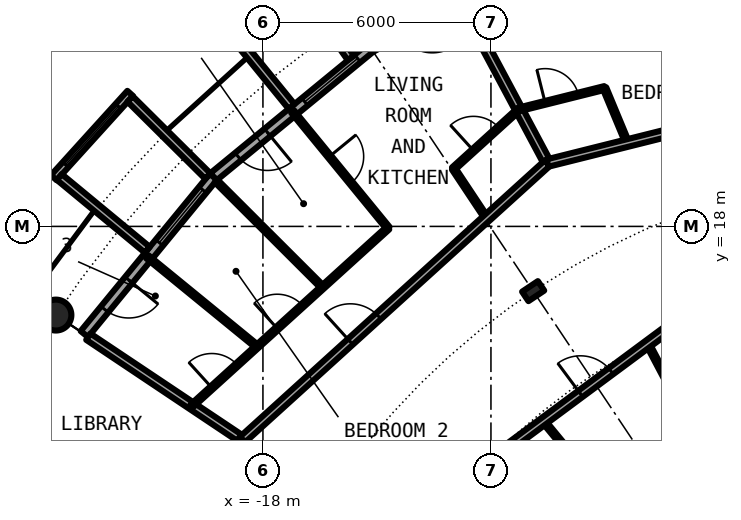
"""IFC4 building model, lengths in metres.
Left out: names, types, materials, properties, quantities, classifications, styles, units other than length and angle.
Written with IfcOpenShell. Run it as: python <this file> out.ifc"""

import sys

from ifc_helpers import new_model, si_unit, direction, frame, frame_2d, origin, origin_2d, place, context, subcontext, project, spatial, rectangle, circle, hollow_circle, i_section, extrude, element, fill, save


model = new_model("IFC4")
c1 = context("Model", 3, precision=1e-05, world=origin(), true_north=direction((0.0, 1.0)))
c2 = subcontext(c1, "Body", "Model", "MODEL_VIEW")
j1 = project(units=[si_unit("LENGTHUNIT", "METRE"), si_unit("PLANEANGLEUNIT", "RADIAN")], contexts=[c1])
p1 = place(None, origin())
s1 = spatial("IfcSite", under=j1, at=p1, CompositionType="ELEMENT")
p2 = place(p1, origin())
s2 = spatial("IfcBuilding", under=s1, at=p2, CompositionType="ELEMENT")
p3 = place(p2, frame((0.0, 0.0, 151.3)))
s3 = spatial("IfcBuildingStorey", under=s2, at=p3, CompositionType="ELEMENT", Elevation=151.3)
p4 = place(p3, frame((-23.448, 15.667, 0.0), z_axis=(0.0, 0.0, 1.0), x_axis=(1.0, 0.0, 0.0)))
e1 = element("IfcColumn", 1, at=p4, inside=s3, PredefinedType="COLUMN", context=c2, shape_type="SweptSolid", body=[
    extrude(hollow_circle(Radius=0.406, WallThickness=0.04, at=origin_2d()), origin(), (0.0, 0.0, 1.0), 3.05),
])
p5 = place(p3, frame((-10.889, 16.297, 0.0), z_axis=(0.0, 0.0, 1.0), x_axis=(-0.55557023302, 0.831469612303, 0.0)))
e2 = element("IfcColumn", 2, at=p5, inside=s3, PredefinedType="COLUMN", context=c2, shape_type="SweptSolid", body=[
    extrude(i_section(OverallWidth=0.3, OverallDepth=0.5, WebThickness=0.014, FlangeThickness=0.028, FilletRadius=0.027, at=origin_2d()), origin(), (0.0, 0.0, 1.0), 3.05),
])
p6 = place(p3, frame((-15.167, 22.699, 0.0), z_axis=(0.0, 0.0, 1.0), x_axis=(-0.773019449054, -0.634382322723, 0.0)))
e3 = element("IfcWall", 3, at=p6, inside=s3, PredefinedType="SOLIDWALL", context=c2, shape_type="SweptSolid", body=[
    extrude(rectangle(XDim=5.352, YDim=0.25, at=frame_2d((2.676, 0.0))), origin(), (0.0, 0.0, 1.0), 2.7),
])
p7 = place(p6, frame((0.441, 0.0, 0.3)))
e4 = element("IfcOpeningElement", 4, at=p7, cuts=e3, PredefinedType="OPENING", context=c2, shape_type="SweptSolid", body=[
    extrude(rectangle(XDim=1.8, YDim=2.1, at=frame_2d((0.9, 1.05))), frame((0.0, 0.135, 0.0), z_axis=(0.0, -1.0, 0.0), x_axis=(1.0, 0.0, 0.0)), (0.0, 0.0, 1.0), 0.27),
])
p8 = place(p6, frame((3.51, 0.0, 0.0)))
e5 = element("IfcOpeningElement", 5, at=p8, cuts=e3, PredefinedType="OPENING", context=c2, shape_type="SweptSolid", body=[
    extrude(rectangle(XDim=1.0, YDim=2.2, at=frame_2d((0.5, 1.1))), frame((0.0, 0.135, 0.0), z_axis=(0.0, -1.0, 0.0), x_axis=(1.0, 0.0, 0.0)), (0.0, 0.0, 1.0), 0.27),
])
p9 = place(p3, frame((-15.688, 22.433, -0.03), z_axis=(0.0, 0.0, 1.0), x_axis=(-0.573260687834, 0.819373043115, 0.0)))
e6 = element("IfcWall", 6, at=p9, inside=s3, PredefinedType="SOLIDWALL", context=c2, shape_type="SweptSolid", body=[
    extrude(rectangle(XDim=2.925, YDim=0.2, at=frame_2d((1.463, 0.0))), origin(), (0.0, 0.0, 1.0), 2.73),
])
p10 = place(p3, frame((-17.246, 21.155, -0.03), z_axis=(0.0, 0.0, 1.0), x_axis=(-0.631741648902, 0.775179004516, 0.0)))
e7 = element("IfcWall", 7, at=p10, inside=s3, PredefinedType="SOLIDWALL", context=c2, shape_type="SweptSolid", body=[
    extrude(rectangle(XDim=3.006, YDim=0.2, at=frame_2d((1.503, 0.0))), origin(), (0.0, 0.0, 1.0), 2.73),
])
p11 = place(p3, frame((-19.304, 19.304, 0.0), z_axis=(0.0, 0.0, 1.0), x_axis=(-0.634382322723, -0.773019449054, 0.0)))
e8 = element("IfcWall", 8, at=p11, inside=s3, PredefinedType="SOLIDWALL", context=c2, shape_type="SweptSolid", body=[
    extrude(rectangle(XDim=5.352, YDim=0.25, at=frame_2d((2.676, 0.0))), origin(), (0.0, 0.0, 1.0), 2.7),
])
p12 = place(p11, frame((0.441, 0.0, 0.3)))
e9 = element("IfcOpeningElement", 9, at=p12, cuts=e8, PredefinedType="OPENING", context=c2, shape_type="SweptSolid", body=[
    extrude(rectangle(XDim=1.8, YDim=2.1, at=frame_2d((0.9, 1.05))), frame((0.0, 0.135, 0.0), z_axis=(0.0, -1.0, 0.0), x_axis=(1.0, 0.0, 0.0)), (0.0, 0.0, 1.0), 0.27),
])
p13 = place(p11, frame((3.51, 0.0, 0.0)))
e10 = element("IfcOpeningElement", 10, at=p13, cuts=e8, PredefinedType="OPENING", context=c2, shape_type="SweptSolid", body=[
    extrude(rectangle(XDim=1.0, YDim=2.2, at=frame_2d((0.5, 1.1))), frame((0.0, 0.135, 0.0), z_axis=(0.0, -1.0, 0.0), x_axis=(1.0, 0.0, 0.0)), (0.0, 0.0, 1.0), 0.27),
])
p14 = place(p3, frame((-21.493, 21.5, -0.03), z_axis=(0.0, 0.0, 1.0), x_axis=(-0.671506829416, -0.740998365753, 0.0)))
e11 = element("IfcWall", 11, at=p14, inside=s3, PredefinedType="SOLIDWALL", context=c2, shape_type="SweptSolid", body=[
    extrude(rectangle(XDim=2.993, YDim=0.2, at=frame_2d((1.497, 0.0))), origin(), (0.0, 0.0, 1.0), 2.73),
])
p15 = place(p14, frame((0.457, 0.0, 0.33)))
e12 = element("IfcOpeningElement", 12, at=p15, cuts=e11, PredefinedType="OPENING", context=c2, shape_type="SweptSolid", body=[
    extrude(circle(Radius=1.04, at=frame_2d((1.04, 1.04))), frame((0.0, 0.11, 0.0), z_axis=(0.0, -1.0, 0.0), x_axis=(1.0, 0.0, 0.0)), (0.0, 0.0, 1.0), 0.22),
])
p16 = place(p3, frame((-19.45, 19.323, -0.03), z_axis=(0.0, 0.0, 1.0), x_axis=(-0.709727076896, 0.704476739375, 0.0)))
e13 = element("IfcWall", 13, at=p16, inside=s3, PredefinedType="SOLIDWALL", context=c2, shape_type="SweptSolid", body=[
    extrude(rectangle(XDim=2.883, YDim=0.2, at=frame_2d((1.441, 0.0))), origin(), (0.0, 0.0, 1.0), 2.73),
])
p17 = place(p3, frame((-21.041, 17.384, -0.03), z_axis=(0.0, 0.0, 1.0), x_axis=(-0.770784861449, 0.63709551667, 0.0)))
e14 = element("IfcWall", 14, at=p17, inside=s3, PredefinedType="SOLIDWALL", context=c2, shape_type="SweptSolid", body=[
    extrude(rectangle(XDim=3.006, YDim=0.2, at=frame_2d((1.503, 0.0))), origin(), (0.0, 0.0, 1.0), 2.73),
])
p18 = place(p3, frame((-12.984, 19.521, 0.0), z_axis=(0.0, 0.0, 1.0), x_axis=(0.55373148684, -0.832695286694, 0.0)))
e15 = element("IfcWall", 15, at=p18, inside=s3, PredefinedType="PARTITIONING", context=c2, shape_type="SweptSolid", body=[
    extrude(rectangle(XDim=1.571, YDim=0.1, at=frame_2d((0.786, 0.0))), origin(), (0.0, 0.0, 1.0), 2.7),
])
p19 = place(p3, frame((-9.013, 21.642, 0.0), z_axis=(0.0, 0.0, 1.0), x_axis=(0.384228756538, -0.923237923099, 0.0)))
e16 = element("IfcWall", 16, at=p19, inside=s3, PredefinedType="PARTITIONING", context=c2, shape_type="SweptSolid", body=[
    extrude(rectangle(XDim=1.569, YDim=0.1, at=frame_2d((0.785, 0.0))), origin(), (0.0, 0.0, 1.0), 2.7),
])
p20 = place(p3, frame((-22.595, 15.098, 0.0), z_axis=(0.0, 0.0, 1.0), x_axis=(0.831387096605, -0.55569370664, 0.0)))
e17 = element("IfcWall", 17, at=p20, inside=s3, PredefinedType="PARTITIONING", context=c2, shape_type="SweptSolid", body=[
    extrude(rectangle(XDim=4.875, YDim=0.2, at=frame_2d((2.438, 0.0))), origin(), (0.0, 0.0, 1.0), 2.7),
])
p21 = place(p3, frame((-21.04, 17.199, 0.0), z_axis=(0.0, 0.0, 1.0), x_axis=(0.774321581607, -0.63279229472, 0.0)))
e18 = element("IfcWall", 18, at=p21, inside=s3, PredefinedType="PARTITIONING", context=c2, shape_type="SweptSolid", body=[
    extrude(rectangle(XDim=3.731, YDim=0.1, at=frame_2d((1.866, 0.0))), origin(), (0.0, 0.0, 1.0), 2.7),
])
p22 = place(p3, frame((-19.234, 19.197, 0.0), z_axis=(0.0, 0.0, 1.0), x_axis=(0.707722727509, -0.706490297858, 0.0)))
e19 = element("IfcWall", 19, at=p22, inside=s3, PredefinedType="PARTITIONING", context=c2, shape_type="SweptSolid", body=[
    extrude(rectangle(XDim=3.962, YDim=0.1, at=frame_2d((1.981, 0.0))), origin(), (0.0, 0.0, 1.0), 2.7),
])
p23 = place(p3, frame((-17.219, 21.023, 0.0), z_axis=(0.0, 0.0, 1.0), x_axis=(0.633590098448, -0.773668913133, 0.0)))
e20 = element("IfcWall", 20, at=p23, inside=s3, PredefinedType="PARTITIONING", context=c2, shape_type="SweptSolid", body=[
    extrude(rectangle(XDim=3.962, YDim=0.1, at=frame_2d((1.981, 0.0))), origin(), (0.0, 0.0, 1.0), 2.7),
])
p24 = place(p23, frame((1.531, 0.0, 0.0)))
e21 = element("IfcOpeningElement", 21, at=p24, cuts=e20, PredefinedType="OPENING", context=c2, shape_type="SweptSolid", body=[
    extrude(rectangle(XDim=0.9, YDim=2.3, at=frame_2d((0.45, 1.15))), frame((0.0, 0.06, 0.0), z_axis=(0.0, -1.0, 0.0), x_axis=(1.0, 0.0, 0.0)), (0.0, 0.0, 1.0), 0.12),
])
p25 = place(p3, frame((-12.809, 23.966, 0.0), z_axis=(0.0, 0.0, 1.0), x_axis=(0.471271812246, -0.881988026553, 0.0)))
e22 = element("IfcWall", 22, at=p25, inside=s3, PredefinedType="PARTITIONING", context=c2, shape_type="SweptSolid", body=[
    extrude(rectangle(XDim=4.874, YDim=0.2, at=frame_2d((2.437, 0.0))), origin(), (0.0, 0.0, 1.0), 2.7),
])
p26 = place(p3, frame((-10.616, 12.875, 0.0), z_axis=(0.0, 0.0, 1.0), x_axis=(0.636045954217, -0.771651180342, 0.0)))
e23 = element("IfcWall", 23, at=p26, inside=s3, PredefinedType="PARTITIONING", context=c2, shape_type="SweptSolid", body=[
    extrude(rectangle(XDim=8.968, YDim=0.1, at=frame_2d((4.484, 0.0))), origin(), (0.0, 0.0, 1.0), 2.7),
])
p27 = place(p26, frame((1.667, 0.0, 0.0)))
e24 = element("IfcOpeningElement", 24, at=p27, cuts=e23, PredefinedType="OPENING", context=c2, shape_type="SweptSolid", body=[
    extrude(rectangle(XDim=0.9, YDim=2.3, at=frame_2d((0.45, 1.15))), frame((0.0, 0.06, 0.0), z_axis=(0.0, -1.0, 0.0), x_axis=(1.0, 0.0, 0.0)), (0.0, 0.0, 1.0), 0.12),
])
p28 = place(p26, frame((6.151, 0.0, 0.0)))
e25 = element("IfcOpeningElement", 25, at=p28, cuts=e23, PredefinedType="OPENING", context=c2, shape_type="SweptSolid", body=[
    extrude(rectangle(XDim=0.9, YDim=2.3, at=frame_2d((0.45, 1.15))), frame((0.0, 0.06, 0.0), z_axis=(0.0, -1.0, 0.0), x_axis=(1.0, 0.0, 0.0)), (0.0, 0.0, 1.0), 0.12),
])
p29 = place(p3, frame((-7.914, 25.997, 0.0), z_axis=(0.0, 0.0, 1.0), x_axis=(0.291291575636, -0.956634317785, 0.0)))
e26 = element("IfcWall", 26, at=p29, inside=s3, PredefinedType="PARTITIONING", context=c2, shape_type="SweptSolid", body=[
    extrude(rectangle(XDim=3.962, YDim=0.1, at=frame_2d((1.981, 0.0))), origin(), (0.0, 0.0, 1.0), 2.7),
])
p30 = place(p29, frame((1.531, 0.0, 0.0)))
e27 = element("IfcOpeningElement", 27, at=p30, cuts=e26, PredefinedType="OPENING", context=c2, shape_type="SweptSolid", body=[
    extrude(rectangle(XDim=0.9, YDim=2.3, at=frame_2d((0.45, 1.15))), frame((0.0, 0.06, 0.0), z_axis=(0.0, -1.0, 0.0), x_axis=(1.0, 0.0, 0.0)), (0.0, 0.0, 1.0), 0.12),
])
p31 = place(p3, frame((-7.875, 14.908, 0.0), z_axis=(0.0, 0.0, 1.0), x_axis=(0.467030118529, -0.884241408432, 0.0)))
e28 = element("IfcWall", 28, at=p31, inside=s3, PredefinedType="PARTITIONING", context=c2, shape_type="SweptSolid", body=[
    extrude(rectangle(XDim=4.278, YDim=0.1, at=frame_2d((2.139, 0.0))), origin(), (0.0, 0.0, 1.0), 2.7),
])
p32 = place(p31, frame((1.689, 0.0, 0.0)))
e29 = element("IfcOpeningElement", 29, at=p32, cuts=e28, PredefinedType="OPENING", context=c2, shape_type="SweptSolid", body=[
    extrude(rectangle(XDim=0.9, YDim=2.3, at=frame_2d((0.45, 1.15))), frame((0.0, 0.06, 0.0), z_axis=(0.0, -1.0, 0.0), x_axis=(1.0, 0.0, 0.0)), (0.0, 0.0, 1.0), 0.12),
])
p33 = place(p3, frame((-13.349, 10.848, 0.0), z_axis=(0.0, 0.0, 1.0), x_axis=(0.803229232922, 0.595670042371, 0.0)))
e30 = element("IfcWall", 30, at=p33, inside=s3, PredefinedType="PARTITIONING", context=c2, shape_type="SweptSolid", body=[
    extrude(rectangle(XDim=10.224, YDim=0.2, at=frame_2d((5.112, 0.0))), origin(), (0.0, 0.0, 1.0), 2.7),
])
p34 = place(p33, frame((4.612, 0.0, 0.0)))
e31 = element("IfcOpeningElement", 31, at=p34, cuts=e30, PredefinedType="OPENING", context=c2, shape_type="SweptSolid", body=[
    extrude(rectangle(XDim=1.0, YDim=2.3, at=frame_2d((0.5, 1.15))), frame((0.0, 0.11, 0.0), z_axis=(0.0, -1.0, 0.0), x_axis=(1.0, 0.0, 0.0)), (0.0, 0.0, 1.0), 0.22),
])
p35 = place(p3, frame((-18.544, 12.385, 0.0), z_axis=(0.0, 0.0, 1.0), x_axis=(0.740849323054, 0.67167125927, 0.0)))
e32 = element("IfcWall", 32, at=p35, inside=s3, PredefinedType="PARTITIONING", context=c2, shape_type="SweptSolid", body=[
    extrude(rectangle(XDim=10.842, YDim=0.2, at=frame_2d((5.421, 0.0))), origin(), (0.0, 0.0, 1.0), 2.7),
])
p36 = place(p35, frame((3.839, 0.0, 0.0)))
e33 = element("IfcOpeningElement", 33, at=p36, cuts=e32, PredefinedType="OPENING", context=c2, shape_type="SweptSolid", body=[
    extrude(rectangle(XDim=1.0, YDim=2.3, at=frame_2d((0.5, 1.15))), frame((0.0, 0.11, 0.0), z_axis=(0.0, -1.0, 0.0), x_axis=(1.0, 0.0, 0.0)), (0.0, 0.0, 1.0), 0.22),
])
p37 = place(p3, frame((-10.512, 19.667, 0.0), z_axis=(0.0, 0.0, 1.0), x_axis=(0.970086843848, 0.242758141765, 0.0)))
e34 = element("IfcWall", 34, at=p37, inside=s3, PredefinedType="PARTITIONING", context=c2, shape_type="SweptSolid", body=[
    extrude(rectangle(XDim=10.842, YDim=0.2, at=frame_2d((5.421, 0.0))), origin(), (0.0, 0.0, 1.0), 2.7),
])
p38 = place(p37, frame((6.002, 0.0, 0.0)))
e35 = element("IfcOpeningElement", 35, at=p38, cuts=e34, PredefinedType="OPENING", context=c2, shape_type="SweptSolid", body=[
    extrude(rectangle(XDim=1.0, YDim=2.3, at=frame_2d((0.5, 1.15))), frame((0.0, 0.11, 0.0), z_axis=(0.0, -1.0, 0.0), x_axis=(1.0, 0.0, 0.0)), (0.0, 0.0, 1.0), 0.22),
])
p39 = place(p3, frame((-19.307, 10.935, 0.0), z_axis=(0.0, 0.0, 1.0), x_axis=(0.465605550524, 0.884992356646, 0.0)))
e36 = element("IfcWall", 36, at=p39, inside=s3, PredefinedType="PARTITIONING", context=c2, shape_type="SweptSolid", body=[
    extrude(rectangle(XDim=1.643, YDim=0.2, at=frame_2d((0.821, 0.0))), origin(), (0.0, 0.0, 1.0), 2.7),
])
p40 = place(p3, frame((-19.872, 13.278, 0.0), z_axis=(0.0, 0.0, 1.0), x_axis=(0.740923753351, 0.671589153962, 0.0)))
e37 = element("IfcWall", 37, at=p40, inside=s3, PredefinedType="PARTITIONING", context=c2, shape_type="SweptSolid", body=[
    extrude(rectangle(XDim=6.969, YDim=0.1, at=frame_2d((3.484, 0.0))), origin(), (0.0, 0.0, 1.0), 2.7),
])
p41 = place(p40, frame((3.034, 0.0, 0.0)))
e38 = element("IfcOpeningElement", 38, at=p41, cuts=e37, PredefinedType="OPENING", context=c2, shape_type="SweptSolid", body=[
    extrude(rectangle(XDim=0.9, YDim=2.3, at=frame_2d((0.45, 1.15))), frame((0.0, 0.06, 0.0), z_axis=(0.0, -1.0, 0.0), x_axis=(1.0, 0.0, 0.0)), (0.0, 0.0, 1.0), 0.12),
])
p42 = place(p40, frame((0.711, 0.0, 0.0)))
e39 = element("IfcOpeningElement", 39, at=p42, cuts=e37, PredefinedType="OPENING", context=c2, shape_type="SweptSolid", body=[
    extrude(rectangle(XDim=0.9, YDim=2.3, at=frame_2d((0.45, 1.15))), frame((0.0, 0.06, 0.0), z_axis=(0.0, -1.0, 0.0), x_axis=(1.0, 0.0, 0.0)), (0.0, 0.0, 1.0), 0.12),
])
p43 = place(p3, frame((-12.993, 19.513, 0.0), z_axis=(0.0, 0.0, 1.0), x_axis=(0.74087097024, 0.671647381783, 0.0)))
e40 = element("IfcWall", 40, at=p43, inside=s3, PredefinedType="PARTITIONING", context=c2, shape_type="SweptSolid", body=[
    extrude(rectangle(XDim=2.324, YDim=0.1, at=frame_2d((1.162, 0.0))), origin(), (0.0, 0.0, 1.0), 2.7),
])
p44 = place(p43, frame((0.719, 0.0, 0.0)))
e41 = element("IfcOpeningElement", 41, at=p44, cuts=e40, PredefinedType="OPENING", context=c2, shape_type="SweptSolid", body=[
    extrude(rectangle(XDim=0.9, YDim=2.3, at=frame_2d((0.45, 1.15))), frame((0.0, 0.06, 0.0), z_axis=(0.0, -1.0, 0.0), x_axis=(1.0, 0.0, 0.0)), (0.0, 0.0, 1.0), 0.12),
])
p45 = place(p3, frame((-11.266, 21.078, 0.0), z_axis=(0.0, 0.0, 1.0), x_axis=(0.970074595874, 0.242807080706, 0.0)))
e42 = element("IfcWall", 42, at=p45, inside=s3, PredefinedType="PARTITIONING", context=c2, shape_type="SweptSolid", body=[
    extrude(rectangle(XDim=2.328, YDim=0.1, at=frame_2d((1.164, 0.0))), origin(), (0.0, 0.0, 1.0), 2.7),
])
p46 = place(p45, frame((0.714, 0.0, 0.0)))
e43 = element("IfcOpeningElement", 43, at=p46, cuts=e42, PredefinedType="OPENING", context=c2, shape_type="SweptSolid", body=[
    extrude(rectangle(XDim=0.9, YDim=2.3, at=frame_2d((0.45, 1.15))), frame((0.0, 0.06, 0.0), z_axis=(0.0, -1.0, 0.0), x_axis=(1.0, 0.0, 0.0)), (0.0, 0.0, 1.0), 0.12),
])
p47 = place(p7, origin())
e44 = element("IfcWindow", 44, at=p47, inside=s3, PartitioningType="SINGLE_PANEL", PredefinedType="WINDOW", context=c2, shape_type="SweptSolid", body=[
    extrude(rectangle(XDim=1.8, YDim=2.1, at=frame_2d((0.9, 1.05))), frame((0.0, 0.03, 0.0), z_axis=(0.0, -1.0, 0.0), x_axis=(1.0, 0.0, 0.0)), (0.0, 0.0, 1.0), 0.06),
])
fill(e4, e44)
p48 = place(p8, origin())
e45 = element("IfcDoor", 45, at=p48, inside=s3, OperationType="SINGLE_SWING_LEFT", PredefinedType="DOOR", context=c2, shape_type="SweptSolid", body=[
    extrude(rectangle(XDim=1.0, YDim=2.2, at=frame_2d((0.5, 1.1))), frame((0.0, 0.025, 0.0), z_axis=(0.0, -1.0, 0.0), x_axis=(1.0, 0.0, 0.0)), (0.0, 0.0, 1.0), 0.05),
])
fill(e5, e45)
p49 = place(p12, origin())
e46 = element("IfcWindow", 46, at=p49, inside=s3, PartitioningType="SINGLE_PANEL", PredefinedType="WINDOW", context=c2, shape_type="SweptSolid", body=[
    extrude(rectangle(XDim=1.8, YDim=2.1, at=frame_2d((0.9, 1.05))), frame((0.0, 0.03, 0.0), z_axis=(0.0, -1.0, 0.0), x_axis=(1.0, 0.0, 0.0)), (0.0, 0.0, 1.0), 0.06),
])
fill(e9, e46)
p50 = place(p15, origin())
e47 = element("IfcWindow", 47, at=p50, inside=s3, PartitioningType="SINGLE_PANEL", PredefinedType="WINDOW", context=c2, shape_type="SweptSolid", body=[
    extrude(circle(Radius=1.04, at=frame_2d((1.04, 1.04))), frame((0.0, 0.03, 0.0), z_axis=(0.0, -1.0, 0.0), x_axis=(1.0, 0.0, 0.0)), (0.0, 0.0, 1.0), 0.06),
])
fill(e12, e47)
p51 = place(p13, origin())
e48 = element("IfcDoor", 48, at=p51, inside=s3, OperationType="SINGLE_SWING_LEFT", PredefinedType="DOOR", context=c2, shape_type="SweptSolid", body=[
    extrude(rectangle(XDim=1.0, YDim=2.2, at=frame_2d((0.5, 1.1))), frame((0.0, 0.025, 0.0), z_axis=(0.0, -1.0, 0.0), x_axis=(1.0, 0.0, 0.0)), (0.0, 0.0, 1.0), 0.05),
])
fill(e10, e48)
p52 = place(p46, origin())
e49 = element("IfcDoor", 49, at=p52, inside=s3, OperationType="SINGLE_SWING_RIGHT", PredefinedType="DOOR", context=c2, shape_type="SweptSolid", body=[
    extrude(rectangle(XDim=0.9, YDim=2.3, at=frame_2d((0.45, 1.15))), frame((0.0, 0.025, 0.0), z_axis=(0.0, -1.0, 0.0), x_axis=(1.0, 0.0, 0.0)), (0.0, 0.0, 1.0), 0.05),
])
fill(e43, e49)
p53 = place(p36, origin())
e50 = element("IfcDoor", 50, at=p53, inside=s3, OperationType="SINGLE_SWING_LEFT", PredefinedType="DOOR", context=c2, shape_type="SweptSolid", body=[
    extrude(rectangle(XDim=1.0, YDim=2.3, at=frame_2d((0.5, 1.15))), frame((0.0, 0.025, 0.0), z_axis=(0.0, -1.0, 0.0), x_axis=(1.0, 0.0, 0.0)), (0.0, 0.0, 1.0), 0.05),
])
fill(e33, e50)
p54 = place(p44, origin())
e51 = element("IfcDoor", 51, at=p54, inside=s3, OperationType="SINGLE_SWING_RIGHT", PredefinedType="DOOR", context=c2, shape_type="SweptSolid", body=[
    extrude(rectangle(XDim=0.9, YDim=2.3, at=frame_2d((0.45, 1.15))), frame((0.0, 0.025, 0.0), z_axis=(0.0, -1.0, 0.0), x_axis=(1.0, 0.0, 0.0)), (0.0, 0.0, 1.0), 0.05),
])
fill(e41, e51)
p55 = place(p24, origin())
e52 = element("IfcDoor", 52, at=p55, inside=s3, OperationType="SINGLE_SWING_LEFT", PredefinedType="DOOR", context=c2, shape_type="SweptSolid", body=[
    extrude(rectangle(XDim=0.9, YDim=2.3, at=frame_2d((0.45, 1.15))), frame((0.0, 0.025, 0.0), z_axis=(0.0, -1.0, 0.0), x_axis=(1.0, 0.0, 0.0)), (0.0, 0.0, 1.0), 0.05),
])
fill(e21, e52)
p56 = place(p41, origin())
e53 = element("IfcDoor", 53, at=p56, inside=s3, OperationType="SINGLE_SWING_RIGHT", PredefinedType="DOOR", context=c2, shape_type="SweptSolid", body=[
    extrude(rectangle(XDim=0.9, YDim=2.3, at=frame_2d((0.45, 1.15))), frame((0.0, 0.025, 0.0), z_axis=(0.0, -1.0, 0.0), x_axis=(1.0, 0.0, 0.0)), (0.0, 0.0, 1.0), 0.05),
])
fill(e38, e53)
p57 = place(p42, origin())
e54 = element("IfcDoor", 54, at=p57, inside=s3, OperationType="SINGLE_SWING_LEFT", PredefinedType="DOOR", context=c2, shape_type="SweptSolid", body=[
    extrude(rectangle(XDim=0.9, YDim=2.3, at=frame_2d((0.45, 1.15))), frame((0.0, 0.025, 0.0), z_axis=(0.0, -1.0, 0.0), x_axis=(1.0, 0.0, 0.0)), (0.0, 0.0, 1.0), 0.05),
])
fill(e39, e54)
p58 = place(p34, origin())
e55 = element("IfcDoor", 55, at=p58, inside=s3, OperationType="SINGLE_SWING_LEFT", PredefinedType="DOOR", context=c2, shape_type="SweptSolid", body=[
    extrude(rectangle(XDim=1.0, YDim=2.3, at=frame_2d((0.5, 1.15))), frame((0.0, 0.025, 0.0), z_axis=(0.0, -1.0, 0.0), x_axis=(1.0, 0.0, 0.0)), (0.0, 0.0, 1.0), 0.05),
])
fill(e31, e55)
save(model, sys.argv[1])
